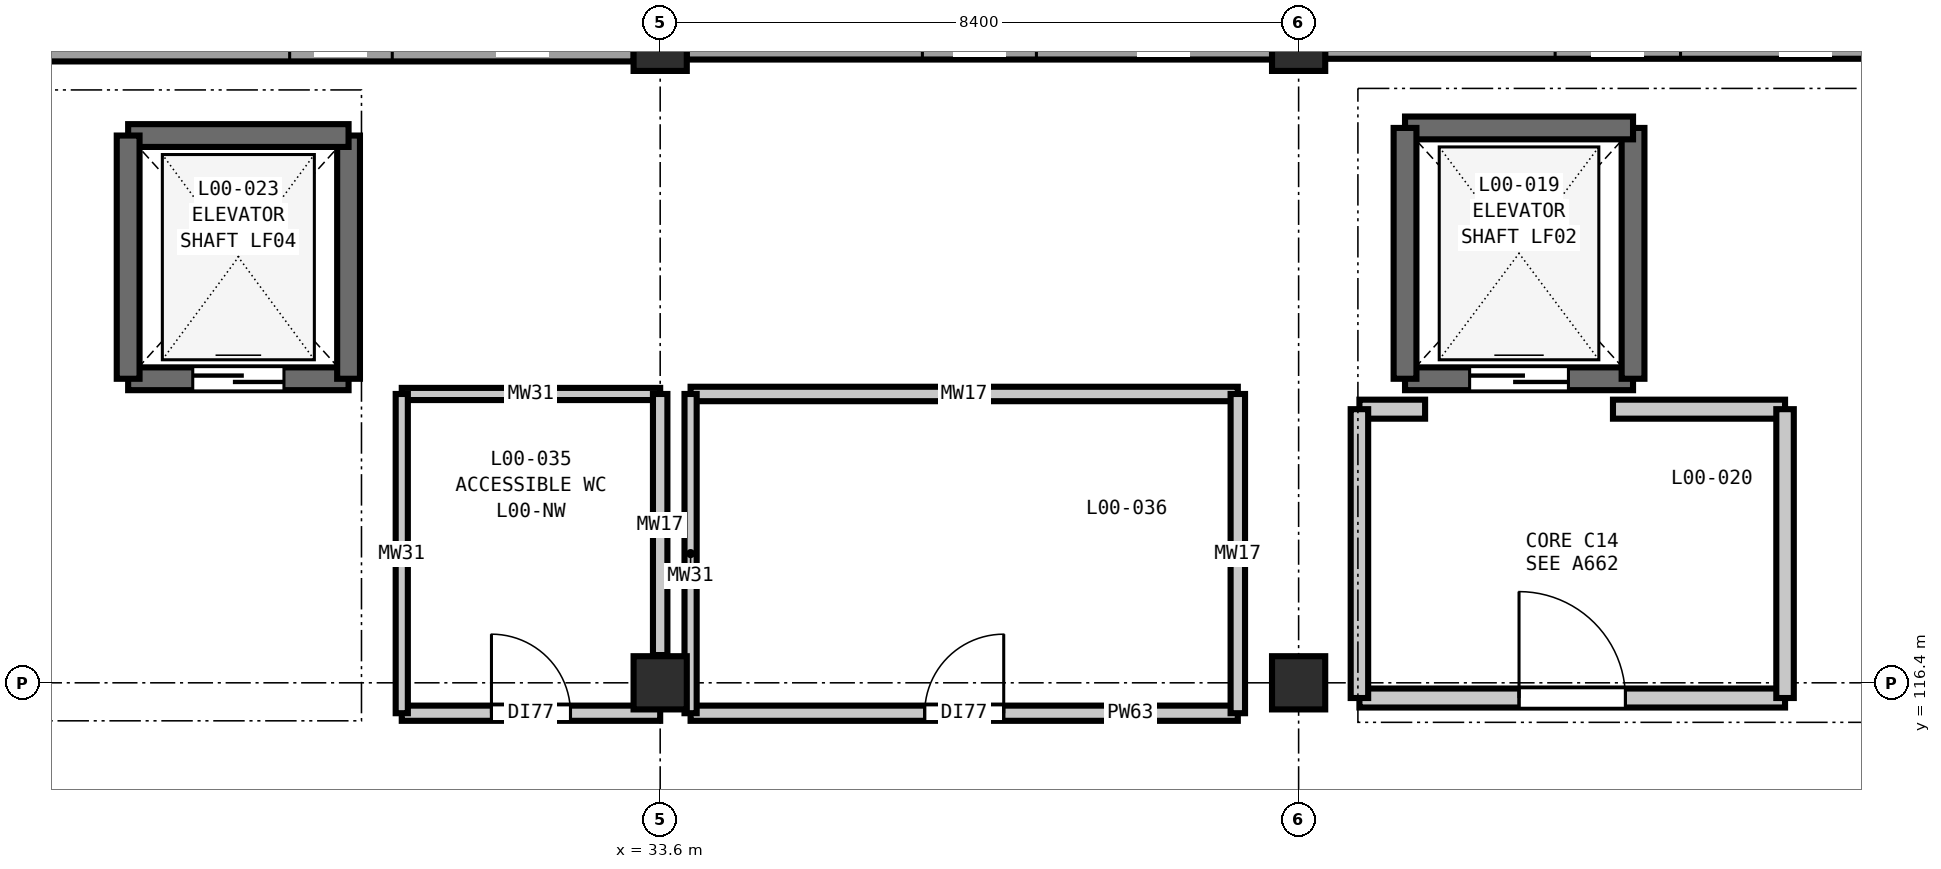
"""IFC4 building model, lengths in metres.
Left out: names, types, materials, properties, quantities, classifications, styles, units other than length and angle.
Written with IfcOpenShell. Run it as: python <this file> out.ifc"""

import sys

from ifc_helpers import new_model, si_unit, direction, frame, frame_2d, origin, origin_2d, place, context, subcontext, project, spatial, rectangle, extrude, element, fill, save


model = new_model("IFC4")
c1 = context("Model", 3, precision=1e-05, world=origin(), true_north=direction((0.0, 1.0)))
c2 = subcontext(c1, "Body", "Model", "MODEL_VIEW")
j1 = project(units=[si_unit("LENGTHUNIT", "METRE"), si_unit("PLANEANGLEUNIT", "RADIAN")], contexts=[c1])
p1 = place(None, origin())
s1 = spatial("IfcSite", under=j1, at=p1, CompositionType="ELEMENT")
p2 = place(p1, origin())
s2 = spatial("IfcBuilding", under=s1, at=p2, CompositionType="ELEMENT")
p3 = place(p2, origin())
s3 = spatial("IfcBuildingStorey", under=s2, at=p3, CompositionType="ELEMENT", Elevation=0.0)
for number, where, z_axis, x_axis in (
    (1, (33.6, 116.4, 0.0), (0.0, 0.0, 1.0), (1.0, 0.0, 0.0)),
    (2, (33.6, 124.8, 0.0), (0.0, 0.0, 1.0), (1.0, 0.0, 0.0)),
    (3, (42.0, 116.4, 0.0), (0.0, 0.0, 1.0), (1.0, 0.0, 0.0)),
    (4, (42.0, 124.8, 0.0), (0.0, 0.0, 1.0), (1.0, 0.0, 0.0)),
):
    element("IfcColumn", number, at=place(p3, frame(where, z_axis=z_axis, x_axis=x_axis)), inside=s3, PredefinedType="COLUMN", context=c2, shape_type="SweptSolid", body=[
        extrude(rectangle(XDim=0.7, YDim=0.7, at=origin_2d()), origin(), (0.0, 0.0, 1.0), 5.4),
    ])
p4 = place(p3, frame((25.548, 124.8, 0.0), z_axis=(0.0, 0.0, 1.0), x_axis=(1.0, 0.0, 0.0)))
e5 = element("IfcWall", 5, at=p4, inside=s3, PredefinedType="SOLIDWALL", context=c2, shape_type="SweptSolid", body=[
    extrude(rectangle(XDim=7.704, YDim=0.45, at=frame_2d((3.852, 0.0))), origin(), (0.0, 0.0, 1.0), 4.68),
])
p5 = place(p4, frame((3.177, 0.0, 0.9)))
e6 = element("IfcOpeningElement", 6, at=p5, cuts=e5, PredefinedType="OPENING", context=c2, shape_type="SweptSolid", body=[
    extrude(rectangle(XDim=1.35, YDim=1.55, at=frame_2d((0.675, 0.775))), frame((0.0, 0.235, 0.0), z_axis=(0.0, -1.0, 0.0), x_axis=(1.0, 0.0, 0.0)), (0.0, 0.0, 1.0), 0.47),
])
p6 = place(p3, frame((33.948, 124.8, 0.0), z_axis=(0.0, 0.0, 1.0), x_axis=(1.0, 0.0, 0.0)))
e7 = element("IfcWall", 7, at=p6, inside=s3, PredefinedType="SOLIDWALL", context=c2, shape_type="SweptSolid", body=[
    extrude(rectangle(XDim=7.704, YDim=0.4, at=frame_2d((3.852, 0.0))), origin(), (0.0, 0.0, 1.0), 4.68),
])
p7 = place(p6, frame((3.102, 0.0, 0.9)))
e8 = element("IfcOpeningElement", 8, at=p7, cuts=e7, PredefinedType="OPENING", context=c2, shape_type="SweptSolid", body=[
    extrude(rectangle(XDim=1.5, YDim=1.55, at=frame_2d((0.75, 0.775))), frame((0.0, 0.21, 0.0), z_axis=(0.0, -1.0, 0.0), x_axis=(1.0, 0.0, 0.0)), (0.0, 0.0, 1.0), 0.42),
])
p8 = place(p3, frame((42.348, 124.8, 0.0), z_axis=(0.0, 0.0, 1.0), x_axis=(1.0, 0.0, 0.0)))
e9 = element("IfcWall", 9, at=p8, inside=s3, PredefinedType="SOLIDWALL", context=c2, shape_type="SweptSolid", body=[
    extrude(rectangle(XDim=7.704, YDim=0.38, at=frame_2d((3.852, 0.0))), origin(), (0.0, 0.0, 1.0), 4.68),
])
p9 = place(p8, frame((3.027, 0.0, 0.9)))
e10 = element("IfcOpeningElement", 10, at=p9, cuts=e9, PredefinedType="OPENING", context=c2, shape_type="SweptSolid", body=[
    extrude(rectangle(XDim=1.65, YDim=1.55, at=frame_2d((0.825, 0.775))), frame((0.0, 0.2, 0.0), z_axis=(0.0, -1.0, 0.0), x_axis=(1.0, 0.0, 0.0)), (0.0, 0.0, 1.0), 0.4),
])
p10 = place(p3, frame((43.4, 120.4, 0.0), z_axis=(0.0, 0.0, 1.0), x_axis=(1.0, 0.0, 0.0)))
e11 = element("IfcWall", 11, at=p10, inside=s3, PredefinedType="SHEAR", context=c2, shape_type="SweptSolid", body=[
    extrude(rectangle(XDim=3.0, YDim=0.3, at=frame_2d((1.5, 0.0))), origin(), (0.0, 0.0, 1.0), 5.4),
])
p11 = place(p10, frame((0.85, 0.0, 0.0)))
e12 = element("IfcOpeningElement", 12, at=p11, cuts=e11, PredefinedType="OPENING", context=c2, shape_type="SweptSolid", body=[
    extrude(rectangle(XDim=1.3, YDim=2.2, at=frame_2d((0.65, 1.1))), frame((0.0, 0.16, 0.0), z_axis=(0.0, -1.0, 0.0), x_axis=(1.0, 0.0, 0.0)), (0.0, 0.0, 1.0), 0.32),
])
p12 = place(p3, frame((46.4, 120.4, 0.0), z_axis=(0.0, 0.0, 1.0), x_axis=(0.0, 1.0, 0.0)))
e13 = element("IfcWall", 13, at=p12, inside=s3, PredefinedType="SHEAR", context=c2, shape_type="SweptSolid", body=[
    extrude(rectangle(XDim=3.3, YDim=0.3, at=frame_2d((1.65, 0.0))), origin(), (0.0, 0.0, 1.0), 5.4),
])
p13 = place(p3, frame((46.4, 123.7, 0.0), z_axis=(0.0, 0.0, 1.0), x_axis=(-1.0, 0.0, 0.0)))
e14 = element("IfcWall", 14, at=p13, inside=s3, PredefinedType="SHEAR", context=c2, shape_type="SweptSolid", body=[
    extrude(rectangle(XDim=3.0, YDim=0.3, at=frame_2d((1.5, 0.0))), origin(), (0.0, 0.0, 1.0), 5.4),
])
p14 = place(p3, frame((43.4, 123.7, 0.0), z_axis=(0.0, 0.0, 1.0), x_axis=(0.0, -1.0, 0.0)))
e15 = element("IfcWall", 15, at=p14, inside=s3, PredefinedType="SHEAR", context=c2, shape_type="SweptSolid", body=[
    extrude(rectangle(XDim=3.3, YDim=0.3, at=frame_2d((1.65, 0.0))), origin(), (0.0, 0.0, 1.0), 5.4),
])
p15 = place(p3, frame((26.6, 120.4, 0.0), z_axis=(0.0, 0.0, 1.0), x_axis=(1.0, 0.0, 0.0)))
e16 = element("IfcWall", 16, at=p15, inside=s3, PredefinedType="SHEAR", context=c2, shape_type="SweptSolid", body=[
    extrude(rectangle(XDim=2.9, YDim=0.3, at=frame_2d((1.45, 0.0))), origin(), (0.0, 0.0, 1.0), 5.4),
])
p16 = place(p15, frame((0.85, 0.0, 0.0)))
e17 = element("IfcOpeningElement", 17, at=p16, cuts=e16, PredefinedType="OPENING", context=c2, shape_type="SweptSolid", body=[
    extrude(rectangle(XDim=1.2, YDim=2.2, at=frame_2d((0.6, 1.1))), frame((0.0, 0.16, 0.0), z_axis=(0.0, -1.0, 0.0), x_axis=(1.0, 0.0, 0.0)), (0.0, 0.0, 1.0), 0.32),
])
p17 = place(p3, frame((29.5, 120.4, 0.0), z_axis=(0.0, 0.0, 1.0), x_axis=(0.0, 1.0, 0.0)))
e18 = element("IfcWall", 18, at=p17, inside=s3, PredefinedType="SHEAR", context=c2, shape_type="SweptSolid", body=[
    extrude(rectangle(XDim=3.2, YDim=0.3, at=frame_2d((1.6, 0.0))), origin(), (0.0, 0.0, 1.0), 5.4),
])
p18 = place(p3, frame((29.5, 123.6, 0.0), z_axis=(0.0, 0.0, 1.0), x_axis=(-1.0, 0.0, 0.0)))
e19 = element("IfcWall", 19, at=p18, inside=s3, PredefinedType="SHEAR", context=c2, shape_type="SweptSolid", body=[
    extrude(rectangle(XDim=2.9, YDim=0.3, at=frame_2d((1.45, 0.0))), origin(), (0.0, 0.0, 1.0), 5.4),
])
p19 = place(p3, frame((26.6, 123.6, 0.0), z_axis=(0.0, 0.0, 1.0), x_axis=(0.0, -1.0, 0.0)))
e20 = element("IfcWall", 20, at=p19, inside=s3, PredefinedType="SHEAR", context=c2, shape_type="SweptSolid", body=[
    extrude(rectangle(XDim=3.2, YDim=0.3, at=frame_2d((1.6, 0.0))), origin(), (0.0, 0.0, 1.0), 5.4),
])
p20 = place(p3, frame((30.2, 116.0, 0.0), z_axis=(0.0, 0.0, 1.0), x_axis=(1.0, 0.0, 0.0)))
e21 = element("IfcWall", 21, at=p20, inside=s3, PredefinedType="PARTITIONING", context=c2, shape_type="SweptSolid", body=[
    extrude(rectangle(XDim=3.4, YDim=0.2, at=frame_2d((1.7, 0.0))), origin(), (0.0, 0.0, 1.0), 5.04),
])
p21 = place(p20, frame((1.18, 0.0, 0.0)))
e22 = element("IfcOpeningElement", 22, at=p21, cuts=e21, PredefinedType="OPENING", context=c2, shape_type="SweptSolid", body=[
    extrude(rectangle(XDim=1.04, YDim=2.1, at=frame_2d((0.52, 1.05))), frame((0.0, 0.11, 0.0), z_axis=(0.0, -1.0, 0.0), x_axis=(1.0, 0.0, 0.0)), (0.0, 0.0, 1.0), 0.22),
])
p22 = place(p3, frame((34.0, 116.0, 0.0), z_axis=(0.0, 0.0, 1.0), x_axis=(1.0, 0.0, 0.0)))
e23 = element("IfcWall", 23, at=p22, inside=s3, PredefinedType="PARTITIONING", context=c2, shape_type="SweptSolid", body=[
    extrude(rectangle(XDim=7.2, YDim=0.2, at=frame_2d((3.6, 0.0))), origin(), (0.0, 0.0, 1.0), 5.04),
])
p23 = place(p22, frame((3.08, 0.0, 0.0)))
e24 = element("IfcOpeningElement", 24, at=p23, cuts=e23, PredefinedType="OPENING", context=c2, shape_type="SweptSolid", body=[
    extrude(rectangle(XDim=1.04, YDim=2.1, at=frame_2d((0.52, 1.05))), frame((0.0, 0.11, 0.0), z_axis=(0.0, -1.0, 0.0), x_axis=(1.0, 0.0, 0.0)), (0.0, 0.0, 1.0), 0.22),
])
p24 = place(p3, frame((42.8, 116.2, 0.0), z_axis=(0.0, 0.0, 1.0), x_axis=(1.0, 0.0, 0.0)))
e25 = element("IfcWall", 25, at=p24, inside=s3, PredefinedType="PARTITIONING", context=c2, shape_type="SweptSolid", body=[
    extrude(rectangle(XDim=5.6, YDim=0.25, at=frame_2d((2.8, 0.0))), origin(), (0.0, 0.0, 1.0), 4.635),
])
p25 = place(p24, frame((2.1, 0.0, 0.0)))
e26 = element("IfcOpeningElement", 26, at=p25, cuts=e25, PredefinedType="OPENING", context=c2, shape_type="SweptSolid", body=[
    extrude(rectangle(XDim=1.4, YDim=2.2, at=frame_2d((0.7, 1.1))), frame((0.0, 0.135, 0.0), z_axis=(0.0, -1.0, 0.0), x_axis=(1.0, 0.0, 0.0)), (0.0, 0.0, 1.0), 0.27),
])
p26 = place(p3, frame((46.136, 120.0, 0.0), z_axis=(0.0, 0.0, 1.0), x_axis=(1.0, 0.0, 0.0)))
e27 = element("IfcWall", 27, at=p26, inside=s3, PredefinedType="PARTITIONING", context=c2, shape_type="SweptSolid", body=[
    extrude(rectangle(XDim=2.264, YDim=0.25, at=frame_2d((1.132, 0.0))), origin(), (0.0, 0.0, 1.0), 5.04),
])
p27 = place(p3, frame((42.8, 120.0, 0.0), z_axis=(0.0, 0.0, 1.0), x_axis=(1.0, 0.0, 0.0)))
e28 = element("IfcWall", 28, at=p27, inside=s3, PredefinedType="PARTITIONING", context=c2, shape_type="SweptSolid", body=[
    extrude(rectangle(XDim=0.864, YDim=0.25, at=frame_2d((0.432, 0.0))), origin(), (0.0, 0.0, 1.0), 5.04),
])
p28 = place(p3, frame((30.2, 120.2, 0.0), z_axis=(0.0, 0.0, 1.0), x_axis=(1.0, 0.0, 0.0)))
e29 = element("IfcWall", 29, at=p28, inside=s3, PredefinedType="PLUMBINGWALL", context=c2, shape_type="SweptSolid", body=[
    extrude(rectangle(XDim=3.4, YDim=0.16, at=frame_2d((1.7, 0.0))), origin(), (0.0, 0.0, 1.0), 5.04),
])
p29 = place(p3, frame((34.0, 120.2, 0.0), z_axis=(0.0, 0.0, 1.0), x_axis=(1.0, 0.0, 0.0)))
e30 = element("IfcWall", 30, at=p29, inside=s3, PredefinedType="PLUMBINGWALL", context=c2, shape_type="SweptSolid", body=[
    extrude(rectangle(XDim=7.2, YDim=0.19, at=frame_2d((3.6, 0.0))), origin(), (0.0, 0.0, 1.0), 5.04),
])
p30 = place(p3, frame((30.2, 116.0, 0.0), z_axis=(0.0, 0.0, 1.0), x_axis=(0.0, 1.0, 0.0)))
e31 = element("IfcWall", 31, at=p30, inside=s3, PredefinedType="PLUMBINGWALL", context=c2, shape_type="SweptSolid", body=[
    extrude(rectangle(XDim=4.2, YDim=0.16, at=frame_2d((2.1, 0.0))), origin(), (0.0, 0.0, 1.0), 5.04),
])
p31 = place(p3, frame((33.6, 116.765, 0.0), z_axis=(0.0, 0.0, 1.0), x_axis=(0.0, 1.0, 0.0)))
e32 = element("IfcWall", 32, at=p31, inside=s3, PredefinedType="PLUMBINGWALL", context=c2, shape_type="SweptSolid", body=[
    extrude(rectangle(XDim=3.435, YDim=0.19, at=frame_2d((1.718, 0.0))), origin(), (0.0, 0.0, 1.0), 4.685),
])
p32 = place(p3, frame((34.0, 116.0, 0.0), z_axis=(0.0, 0.0, 1.0), x_axis=(0.0, 1.0, 0.0)))
e33 = element("IfcWall", 33, at=p32, inside=s3, PredefinedType="PLUMBINGWALL", context=c2, shape_type="SweptSolid", body=[
    extrude(rectangle(XDim=4.2, YDim=0.16, at=frame_2d((2.1, 0.0))), origin(), (0.0, 0.0, 1.0), 5.04),
])
p33 = place(p3, frame((41.2, 116.0, 0.0), z_axis=(0.0, 0.0, 1.0), x_axis=(0.0, 1.0, 0.0)))
e34 = element("IfcWall", 34, at=p33, inside=s3, PredefinedType="PLUMBINGWALL", context=c2, shape_type="SweptSolid", body=[
    extrude(rectangle(XDim=4.2, YDim=0.19, at=frame_2d((2.1, 0.0))), origin(), (0.0, 0.0, 1.0), 5.04),
])
for number, where, z_axis, x_axis in (
    (35, (42.8, 116.2, 0.0), (0.0, 0.0, 1.0), (0.0, 1.0, 0.0)),
    (36, (48.4, 116.2, 0.0), (0.0, 0.0, 1.0), (0.0, 1.0, 0.0)),
):
    element("IfcWall", number, at=place(p3, frame(where, z_axis=z_axis, x_axis=x_axis)), inside=s3, PredefinedType="PARTITIONING", context=c2, shape_type="SweptSolid", body=[
        extrude(rectangle(XDim=3.8, YDim=0.23, at=frame_2d((1.9, 0.0))), origin(), (0.0, 0.0, 1.0), 5.04),
    ])
p34 = place(p11, origin())
e37 = element("IfcDoor", 37, at=p34, inside=s3, OperationType="DOUBLE_DOOR_SLIDING", PredefinedType="DOOR", context=c2, shape_type="SweptSolid", body=[
    extrude(rectangle(XDim=1.3, YDim=2.2, at=frame_2d((0.65, 1.1))), frame((0.0, 0.025, 0.0), z_axis=(0.0, -1.0, 0.0), x_axis=(1.0, 0.0, 0.0)), (0.0, 0.0, 1.0), 0.05),
])
fill(e12, e37)
p35 = place(p16, origin())
e38 = element("IfcDoor", 38, at=p35, inside=s3, OperationType="DOUBLE_DOOR_SLIDING", PredefinedType="DOOR", context=c2, shape_type="SweptSolid", body=[
    extrude(rectangle(XDim=1.2, YDim=2.2, at=frame_2d((0.6, 1.1))), frame((0.0, 0.025, 0.0), z_axis=(0.0, -1.0, 0.0), x_axis=(1.0, 0.0, 0.0)), (0.0, 0.0, 1.0), 0.05),
])
fill(e17, e38)
p36 = place(p21, origin())
e39 = element("IfcDoor", 39, at=p36, inside=s3, OperationType="SINGLE_SWING_LEFT", PredefinedType="DOOR", context=c2, shape_type="SweptSolid", body=[
    extrude(rectangle(XDim=1.04, YDim=2.1, at=frame_2d((0.52, 1.05))), frame((0.0, 0.025, 0.0), z_axis=(0.0, -1.0, 0.0), x_axis=(1.0, 0.0, 0.0)), (0.0, 0.0, 1.0), 0.05),
])
fill(e22, e39)
p37 = place(p23, origin())
e40 = element("IfcDoor", 40, at=p37, inside=s3, OperationType="SINGLE_SWING_RIGHT", PredefinedType="DOOR", context=c2, shape_type="SweptSolid", body=[
    extrude(rectangle(XDim=1.04, YDim=2.1, at=frame_2d((0.52, 1.05))), frame((0.0, 0.025, 0.0), z_axis=(0.0, -1.0, 0.0), x_axis=(1.0, 0.0, 0.0)), (0.0, 0.0, 1.0), 0.05),
])
fill(e24, e40)
p38 = place(p25, origin())
e41 = element("IfcDoor", 41, at=p38, inside=s3, OperationType="SINGLE_SWING_LEFT", PredefinedType="DOOR", context=c2, shape_type="SweptSolid", body=[
    extrude(rectangle(XDim=1.4, YDim=2.2, at=frame_2d((0.7, 1.1))), frame((0.0, 0.025, 0.0), z_axis=(0.0, -1.0, 0.0), x_axis=(1.0, 0.0, 0.0)), (0.0, 0.0, 1.0), 0.05),
])
fill(e26, e41)
save(model, sys.argv[1])
